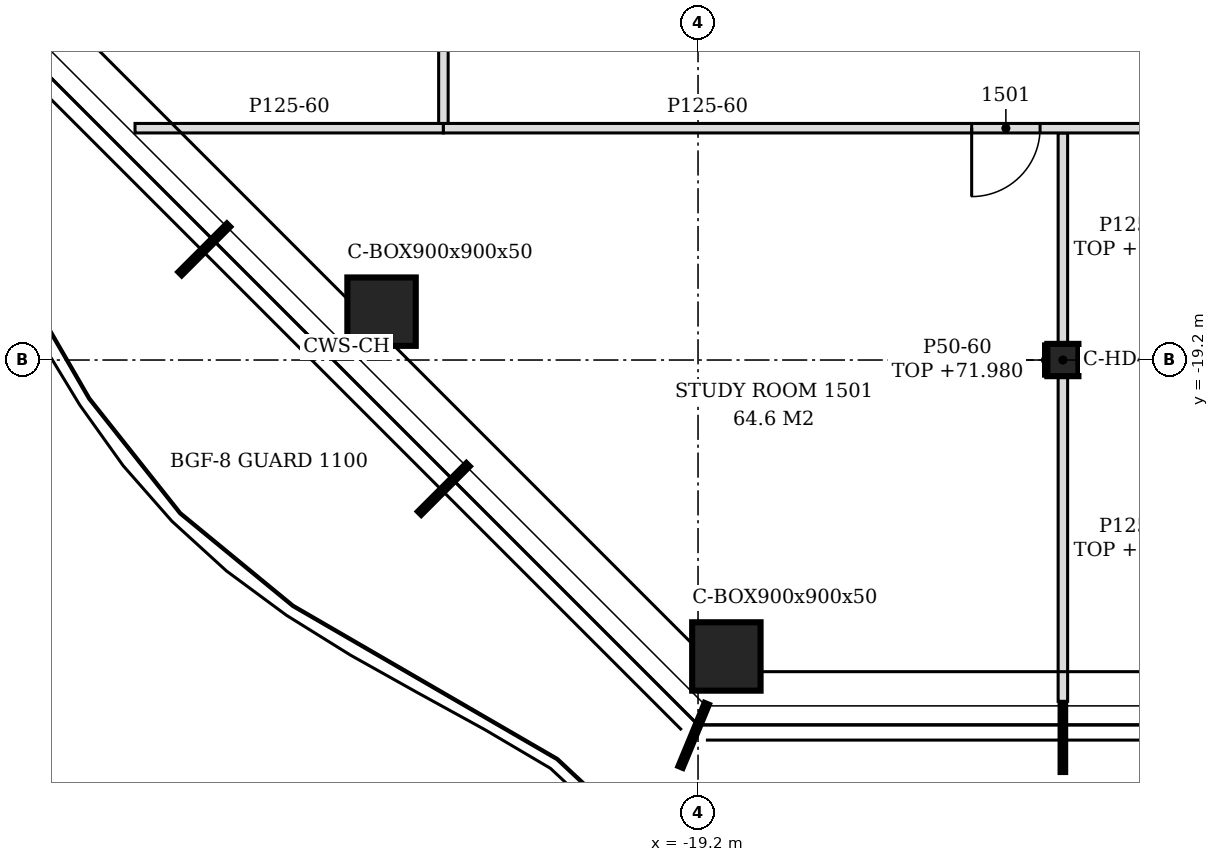
"""IFC4 building model, lengths in metres.
Left out: names, types, materials, properties, quantities, classifications, styles, units other than length and angle.
Written with IfcOpenShell. Run it as: python <this file> out.ifc"""

import sys

from ifc_helpers import new_model, si_unit, direction, frame, frame_2d, origin, origin_2d, place, context, subcontext, project, spatial, polyline, rectangle, hollow_rectangle, i_section, outline, extrude, element, fill, save


model = new_model("IFC4")
c1 = context("Model", 3, precision=1e-05, world=origin(), true_north=direction((0.0, 1.0)))
c2 = subcontext(c1, "Body", "Model", "MODEL_VIEW")
j1 = project(units=[si_unit("LENGTHUNIT", "METRE"), si_unit("PLANEANGLEUNIT", "RADIAN")], contexts=[c1])
p1 = place(None, origin())
s1 = spatial("IfcSite", under=j1, at=p1, CompositionType="ELEMENT")
p2 = place(p1, origin())
s2 = spatial("IfcBuilding", under=s1, at=p2, CompositionType="ELEMENT")
p3 = place(p2, frame((0.0, 0.0, 69.0)))
s3 = spatial("IfcBuildingStorey", under=s2, at=p3, CompositionType="ELEMENT", Elevation=69.0)
for number, where, z_axis, x_axis in (
    (1, (-18.827, -23.1, -0.15), (0.0, 0.0, 1.0), (1.0, 0.0, 0.0)),
    (2, (-23.364, -18.564, -0.15), (0.0, 0.0, 1.0), (1.0, 0.0, 0.0)),
):
    element("IfcColumn", number, at=place(p3, frame(where, z_axis=z_axis, x_axis=x_axis)), inside=s3, PredefinedType="COLUMN", context=c2, shape_type="SweptSolid", body=[
        extrude(hollow_rectangle(XDim=0.9, YDim=0.9, WallThickness=0.05, at=origin_2d()), origin(), (0.0, 0.0, 1.0), 3.6),
    ])
p4 = place(p3, frame((-14.4, -19.2, -0.15), z_axis=(0.0, 0.0, 1.0), x_axis=(1.0, 0.0, 0.0)))
e3 = element("IfcColumn", 3, at=p4, inside=s3, PredefinedType="COLUMN", context=c2, shape_type="SweptSolid", body=[
    extrude(i_section(OverallWidth=0.409, OverallDepth=0.425, WebThickness=0.033, FlangeThickness=0.052, FilletRadius=0.015, at=origin_2d()), origin(), (0.0, 0.0, 1.0), 3.6),
])
p5 = place(p3, frame((-14.4, -23.69, 0.0), z_axis=(0.0, 0.0, 1.0), x_axis=(0.0, 1.0, 0.0)))
e4 = element("IfcWall", 4, at=p5, inside=s3, PredefinedType="PARTITIONING", context=c2, shape_type="SweptSolid", body=[
    extrude(outline(polyline([(0.0, 0.0), (4.277, 0.0), (4.278, 3.03), (0.74, 3.03), (0.738, 2.93), (0.44, 2.93), (0.438, 3.03), (0.0, 3.03), (0.0, 0.0)])), frame((0.0, 0.062, 0.0), z_axis=(0.0, -1.0, 0.0), x_axis=(1.0, 0.0, 0.0)), (0.0, 0.0, 1.0), 0.125),
])
p6 = place(p3, frame((-14.4, -18.988, 0.0), z_axis=(0.0, 0.0, 1.0), x_axis=(0.0, 1.0, 0.0)))
e5 = element("IfcWall", 5, at=p6, inside=s3, PredefinedType="PARTITIONING", context=c2, shape_type="SweptSolid", body=[
    extrude(rectangle(XDim=2.775, YDim=0.125, at=frame_2d((1.388, 0.0))), origin(), (0.0, 0.0, 1.0), 2.93),
])
p7 = place(p3, frame((-26.607, -16.15, 0.0), z_axis=(0.0, 0.0, 1.0), x_axis=(1.0, 0.0, 0.0)))
e6 = element("IfcWall", 6, at=p7, inside=s3, PredefinedType="PARTITIONING", context=c2, shape_type="SweptSolid", body=[
    extrude(outline(polyline([(0.0, 0.0), (4.057, 0.0), (4.057, 3.45), (1.104, 3.45), (1.102, 2.93), (0.555, 2.93), (0.553, 3.45), (0.0, 3.45), (0.0, 0.0)])), frame((0.0, 0.062, 0.0), z_axis=(0.0, -1.0, 0.0), x_axis=(1.0, 0.0, 0.0)), (0.0, 0.0, 1.0), 0.125),
])
p8 = place(p3, frame((-22.55, -16.15, 0.0), z_axis=(0.0, 0.0, 1.0), x_axis=(1.0, 0.0, 0.0)))
e7 = element("IfcWall", 7, at=p8, inside=s3, PredefinedType="PARTITIONING", context=c2, shape_type="SweptSolid", body=[
    extrude(outline(polyline([(0.0, 0.0), (41.688, 0.0), (41.688, 2.73), (41.6, 2.73), (41.598, 3.45), (29.9, 3.45), (29.898, 2.73), (29.6, 2.73), (29.598, 3.45), (17.9, 3.45), (17.898, 2.73), (17.6, 2.73), (17.598, 3.45), (8.3, 3.45), (8.298, 2.93), (8.0, 2.93), (7.998, 3.45), (0.0, 3.45), (0.0, 0.0)])), frame((0.0, 0.062, 0.0), z_axis=(0.0, -1.0, 0.0), x_axis=(1.0, 0.0, 0.0)), (0.0, 0.0, 1.0), 0.125),
])
p9 = place(p8, frame((6.95, 0.0, 0.0)))
e8 = element("IfcOpeningElement", 8, at=p9, cuts=e7, PredefinedType="OPENING", context=c2, shape_type="SweptSolid", body=[
    extrude(rectangle(XDim=0.9, YDim=2.1, at=frame_2d((0.45, 1.05))), frame((0.0, 0.073, 0.0), z_axis=(0.0, -1.0, 0.0), x_axis=(1.0, 0.0, 0.0)), (0.0, 0.0, 1.0), 0.145),
])
p10 = place(p8, frame((11.936, 0.0, 0.0)))
e9 = element("IfcOpeningElement", 9, at=p10, cuts=e7, PredefinedType="OPENING", context=c2, shape_type="SweptSolid", body=[
    extrude(rectangle(XDim=0.9, YDim=2.1, at=frame_2d((0.45, 1.05))), frame((0.0, 0.073, 0.0), z_axis=(0.0, -1.0, 0.0), x_axis=(1.0, 0.0, 0.0)), (0.0, 0.0, 1.0), 0.145),
])
p11 = place(p8, frame((16.55, 0.0, 0.0)))
e10 = element("IfcOpeningElement", 10, at=p11, cuts=e7, PredefinedType="OPENING", context=c2, shape_type="SweptSolid", body=[
    extrude(rectangle(XDim=0.9, YDim=2.1, at=frame_2d((0.45, 1.05))), frame((0.0, 0.073, 0.0), z_axis=(0.0, -1.0, 0.0), x_axis=(1.0, 0.0, 0.0)), (0.0, 0.0, 1.0), 0.145),
])
p12 = place(p8, frame((21.35, 0.0, 0.0)))
e11 = element("IfcOpeningElement", 11, at=p12, cuts=e7, PredefinedType="OPENING", context=c2, shape_type="SweptSolid", body=[
    extrude(rectangle(XDim=0.9, YDim=2.1, at=frame_2d((0.45, 1.05))), frame((0.0, 0.073, 0.0), z_axis=(0.0, -1.0, 0.0), x_axis=(1.0, 0.0, 0.0)), (0.0, 0.0, 1.0), 0.145),
])
p13 = place(p8, frame((26.15, 0.0, 0.0)))
e12 = element("IfcOpeningElement", 12, at=p13, cuts=e7, PredefinedType="OPENING", context=c2, shape_type="SweptSolid", body=[
    extrude(rectangle(XDim=0.9, YDim=2.1, at=frame_2d((0.45, 1.05))), frame((0.0, 0.073, 0.0), z_axis=(0.0, -1.0, 0.0), x_axis=(1.0, 0.0, 0.0)), (0.0, 0.0, 1.0), 0.145),
])
p14 = place(p8, frame((30.764, 0.0, 0.0)))
e13 = element("IfcOpeningElement", 13, at=p14, cuts=e7, PredefinedType="OPENING", context=c2, shape_type="SweptSolid", body=[
    extrude(rectangle(XDim=0.9, YDim=2.1, at=frame_2d((0.45, 1.05))), frame((0.0, 0.073, 0.0), z_axis=(0.0, -1.0, 0.0), x_axis=(1.0, 0.0, 0.0)), (0.0, 0.0, 1.0), 0.145),
])
p15 = place(p8, frame((32.35, 0.0, 0.0)))
e14 = element("IfcOpeningElement", 14, at=p15, cuts=e7, PredefinedType="OPENING", context=c2, shape_type="SweptSolid", body=[
    extrude(rectangle(XDim=0.9, YDim=2.1, at=frame_2d((0.45, 1.05))), frame((0.0, 0.073, 0.0), z_axis=(0.0, -1.0, 0.0), x_axis=(1.0, 0.0, 0.0)), (0.0, 0.0, 1.0), 0.145),
])
p16 = place(p8, frame((37.25, 0.0, 0.0)))
e15 = element("IfcOpeningElement", 15, at=p16, cuts=e7, PredefinedType="OPENING", context=c2, shape_type="SweptSolid", body=[
    extrude(rectangle(XDim=0.9, YDim=2.1, at=frame_2d((0.45, 1.05))), frame((0.0, 0.073, 0.0), z_axis=(0.0, -1.0, 0.0), x_axis=(1.0, 0.0, 0.0)), (0.0, 0.0, 1.0), 0.145),
])
p17 = place(p3, frame((-22.55, -16.087, 0.0), z_axis=(0.0, 0.0, 1.0), x_axis=(0.0, 1.0, 0.0)))
e16 = element("IfcWall", 16, at=p17, inside=s3, PredefinedType="PARTITIONING", context=c2, shape_type="SweptSolid", body=[
    extrude(outline(polyline([(0.0, 0.0), (36.276, 0.0), (36.276, 3.45), (36.022, 3.45), (36.02, 2.63), (34.907, 2.63), (34.905, 3.45), (30.597, 3.45), (30.595, 2.83), (30.377, 2.83), (30.375, 3.45), (25.798, 3.45), (25.795, 2.83), (25.577, 2.83), (25.575, 3.45), (20.998, 3.45), (20.996, 2.83), (20.778, 2.83), (20.775, 3.45), (16.198, 3.45), (16.196, 2.83), (15.978, 2.83), (15.976, 3.45), (11.397, 3.45), (11.396, 2.83), (11.177, 2.83), (11.176, 3.45), (6.597, 3.45), (6.595, 2.83), (6.377, 2.83), (6.375, 3.45), (1.798, 3.45), (1.795, 2.83), (1.577, 2.83), (1.575, 3.45), (0.0, 3.45), (0.0, 0.0)])), frame((0.0, 0.062, 0.0), z_axis=(0.0, -1.0, 0.0), x_axis=(1.0, 0.0, 0.0)), (0.0, 0.0, 1.0), 0.125),
])
p18 = place(p17, frame((10.137, 0.0, 0.0)))
e17 = element("IfcOpeningElement", 17, at=p18, cuts=e16, PredefinedType="OPENING", context=c2, shape_type="SweptSolid", body=[
    extrude(rectangle(XDim=0.9, YDim=2.1, at=frame_2d((0.45, 1.05))), frame((0.0, 0.073, 0.0), z_axis=(0.0, -1.0, 0.0), x_axis=(1.0, 0.0, 0.0)), (0.0, 0.0, 1.0), 0.145),
])
p19 = place(p17, frame((11.711, 0.0, 0.0)))
e18 = element("IfcOpeningElement", 18, at=p19, cuts=e16, PredefinedType="OPENING", context=c2, shape_type="SweptSolid", body=[
    extrude(rectangle(XDim=0.9, YDim=2.1, at=frame_2d((0.45, 1.05))), frame((0.0, 0.073, 0.0), z_axis=(0.0, -1.0, 0.0), x_axis=(1.0, 0.0, 0.0)), (0.0, 0.0, 1.0), 0.145),
])
p20 = place(p17, frame((17.288, 0.0, 0.0)))
e19 = element("IfcOpeningElement", 19, at=p20, cuts=e16, PredefinedType="OPENING", context=c2, shape_type="SweptSolid", body=[
    extrude(rectangle(XDim=0.9, YDim=2.1, at=frame_2d((0.45, 1.05))), frame((0.0, 0.073, 0.0), z_axis=(0.0, -1.0, 0.0), x_axis=(1.0, 0.0, 0.0)), (0.0, 0.0, 1.0), 0.145),
])
p21 = place(p17, frame((21.063, 0.0, 0.0)))
e20 = element("IfcOpeningElement", 20, at=p21, cuts=e16, PredefinedType="OPENING", context=c2, shape_type="SweptSolid", body=[
    extrude(rectangle(XDim=0.9, YDim=2.1, at=frame_2d((0.45, 1.05))), frame((0.0, 0.073, 0.0), z_axis=(0.0, -1.0, 0.0), x_axis=(1.0, 0.0, 0.0)), (0.0, 0.0, 1.0), 0.145),
])
p22 = place(p17, frame((27.188, 0.0, 0.0)))
e21 = element("IfcOpeningElement", 21, at=p22, cuts=e16, PredefinedType="OPENING", context=c2, shape_type="SweptSolid", body=[
    extrude(rectangle(XDim=0.9, YDim=2.1, at=frame_2d((0.45, 1.05))), frame((0.0, 0.073, 0.0), z_axis=(0.0, -1.0, 0.0), x_axis=(1.0, 0.0, 0.0)), (0.0, 0.0, 1.0), 0.145),
])
p23 = place(p17, frame((30.415, 0.0, 0.0)))
e22 = element("IfcOpeningElement", 22, at=p23, cuts=e16, PredefinedType="OPENING", context=c2, shape_type="SweptSolid", body=[
    extrude(rectangle(XDim=0.9, YDim=2.1, at=frame_2d((0.45, 1.05))), frame((0.0, 0.073, 0.0), z_axis=(0.0, -1.0, 0.0), x_axis=(1.0, 0.0, 0.0)), (0.0, 0.0, 1.0), 0.145),
])
p24 = place(p3, frame((-14.629, -19.413, 0.0), z_axis=(0.0, 0.0, 1.0), x_axis=(0.0, 1.0, 0.0)))
e23 = element("IfcWall", 23, at=p24, inside=s3, PredefinedType="PARTITIONING", context=c2, shape_type="SweptSolid", body=[
    extrude(rectangle(XDim=0.425, YDim=0.05, at=frame_2d((0.212, 0.0))), origin(), (0.0, 0.0, 1.0), 2.98),
])
p25 = place(p9, frame((0.9, 0.0, 0.0), z_axis=(0.0, 0.0, 1.0), x_axis=(-1.0, 0.0, 0.0)))
e24 = element("IfcDoor", 24, at=p25, inside=s3, OperationType="SINGLE_SWING_RIGHT", PredefinedType="DOOR", context=c2, shape_type="SweptSolid", body=[
    extrude(rectangle(XDim=0.9, YDim=2.1, at=frame_2d((0.45, 1.05))), frame((0.0, 0.025, 0.0), z_axis=(0.0, -1.0, 0.0), x_axis=(1.0, 0.0, 0.0)), (0.0, 0.0, 1.0), 0.05),
])
fill(e8, e24)
save(model, sys.argv[1])
